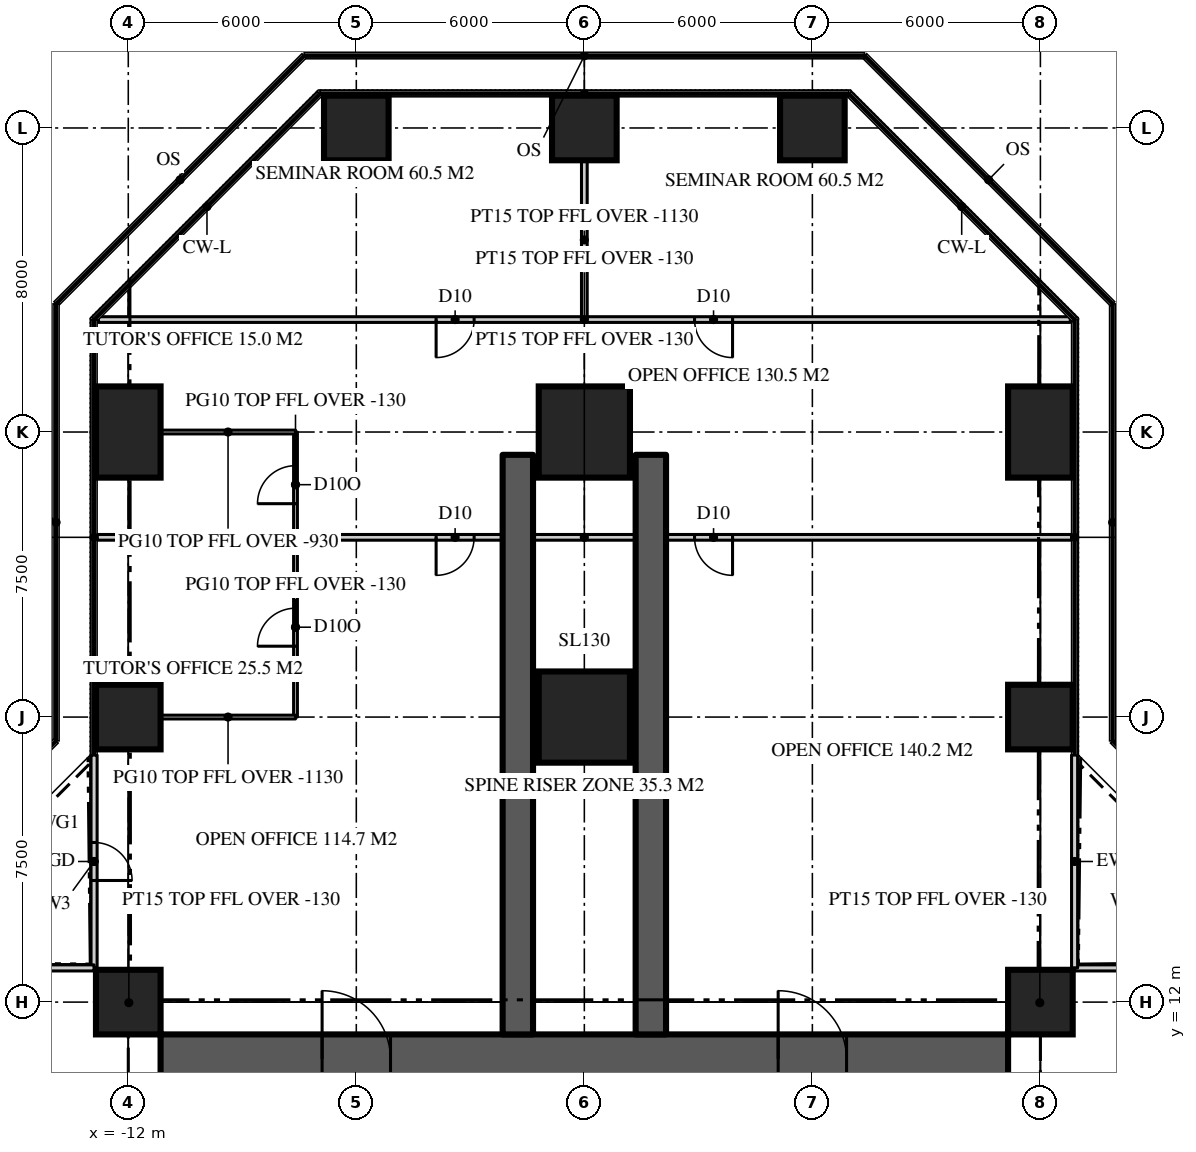
"""IFC4 building model, lengths in metres.
Left out: names, types, materials, properties, quantities, classifications, styles, units other than length and angle.
Written with IfcOpenShell. Run it as: python <this file> out.ifc"""

import sys

from ifc_helpers import new_model, si_unit, direction, frame, frame_2d, origin, origin_2d, place, context, subcontext, project, spatial, rectangle, extrude, element, fill, save


model = new_model("IFC4")
c1 = context("Model", 3, precision=1e-05, world=origin(), true_north=direction((0.0, 1.0)))
c2 = subcontext(c1, "Body", "Model", "MODEL_VIEW")
j1 = project(units=[si_unit("LENGTHUNIT", "METRE"), si_unit("PLANEANGLEUNIT", "RADIAN")], contexts=[c1])
p1 = place(None, origin())
s1 = spatial("IfcSite", under=j1, at=p1, CompositionType="ELEMENT")
p2 = place(p1, origin())
s2 = spatial("IfcBuilding", under=s1, at=p2, CompositionType="ELEMENT")
p3 = place(p2, frame((0.0, 0.0, 109.8)))
s3 = spatial("IfcBuildingStorey", under=s2, at=p3, CompositionType="ELEMENT", Elevation=109.8)
p4 = place(p3, frame((-11.15, 10.5, 0.0), z_axis=(0.0, 0.0, 1.0), x_axis=(1.0, 0.0, 0.0)))
e1 = element("IfcWall", 1, at=p4, inside=s3, PredefinedType="SHEAR", context=c2, shape_type="SweptSolid", body=[
    extrude(rectangle(XDim=22.3, YDim=1.3, at=frame_2d((11.15, 0.0))), origin(), (0.0, 0.0, 1.0), 3.9),
])
p5 = place(p4, frame((4.25, 0.0, 0.0)))
e2 = element("IfcOpeningElement", 2, at=p5, cuts=e1, PredefinedType="OPENING", context=c2, shape_type="SweptSolid", body=[
    extrude(rectangle(XDim=1.8, YDim=2.2, at=frame_2d((0.9, 1.1))), frame((0.0, 0.66, 0.0), z_axis=(0.0, -1.0, 0.0), x_axis=(1.0, 0.0, 0.0)), (0.0, 0.0, 1.0), 1.32),
])
p6 = place(p4, frame((16.25, 0.0, 0.0)))
e3 = element("IfcOpeningElement", 3, at=p6, cuts=e1, PredefinedType="OPENING", context=c2, shape_type="SweptSolid", body=[
    extrude(rectangle(XDim=1.8, YDim=2.2, at=frame_2d((0.9, 1.1))), frame((0.0, 0.66, 0.0), z_axis=(0.0, -1.0, 0.0), x_axis=(1.0, 0.0, 0.0)), (0.0, 0.0, 1.0), 1.32),
])
for number, where, z_axis, x_axis in (
    (4, (1.75, 11.15, 0.0), (0.0, 0.0, 1.0), (0.0, 1.0, 0.0)),
    (5, (-1.75, 11.15, 0.0), (0.0, 0.0, 1.0), (0.0, 1.0, 0.0)),
):
    element("IfcWall", number, at=place(p3, frame(where, z_axis=z_axis, x_axis=x_axis)), inside=s3, PredefinedType="SHEAR", context=c2, shape_type="SweptSolid", body=[
        extrude(rectangle(XDim=15.25, YDim=0.8, at=frame_2d((7.625, 0.0))), origin(), (0.0, 0.0, 1.0), 3.9),
    ])
for number, where, z_axis, x_axis in (
    (6, (-12.0, 12.0, 0.0), (0.0, 0.0, 1.0), (1.0, 0.0, 0.0)),
    (7, (12.0, 12.0, 0.0), (0.0, 0.0, 1.0), (1.0, 0.0, 0.0)),
    (8, (-12.0, 19.5, 0.0), (0.0, 0.0, 1.0), (1.0, 0.0, 0.0)),
):
    element("IfcColumn", number, at=place(p3, frame(where, z_axis=z_axis, x_axis=x_axis)), inside=s3, PredefinedType="COLUMN", context=c2, shape_type="SweptSolid", body=[
        extrude(rectangle(XDim=1.7, YDim=1.7, at=origin_2d()), origin(), (0.0, 0.0, 1.0), 3.9),
    ])
p7 = place(p3, frame((0.0, 19.5, 0.0), z_axis=(0.0, 0.0, 1.0), x_axis=(1.0, 0.0, 0.0)))
e9 = element("IfcColumn", 9, at=p7, inside=s3, PredefinedType="COLUMN", context=c2, shape_type="SweptSolid", body=[
    extrude(rectangle(XDim=2.4, YDim=2.4, at=origin_2d()), origin(), (0.0, 0.0, 1.0), 3.9),
])
p8 = place(p3, frame((12.0, 19.5, 0.0), z_axis=(0.0, 0.0, 1.0), x_axis=(1.0, 0.0, 0.0)))
e10 = element("IfcColumn", 10, at=p8, inside=s3, PredefinedType="COLUMN", context=c2, shape_type="SweptSolid", body=[
    extrude(rectangle(XDim=1.7, YDim=1.7, at=origin_2d()), origin(), (0.0, 0.0, 1.0), 3.9),
])
p9 = place(p3, frame((-12.0, 27.0, 0.0), z_axis=(0.0, 0.0, 1.0), x_axis=(1.0, 0.0, 0.0)))
e11 = element("IfcColumn", 11, at=p9, inside=s3, PredefinedType="COLUMN", context=c2, shape_type="SweptSolid", body=[
    extrude(rectangle(XDim=1.7, YDim=2.4, at=origin_2d()), origin(), (0.0, 0.0, 1.0), 3.9),
])
p10 = place(p3, frame((0.0, 27.0, 0.0), z_axis=(0.0, 0.0, 1.0), x_axis=(1.0, 0.0, 0.0)))
e12 = element("IfcColumn", 12, at=p10, inside=s3, PredefinedType="COLUMN", context=c2, shape_type="SweptSolid", body=[
    extrude(rectangle(XDim=2.4, YDim=2.4, at=origin_2d()), origin(), (0.0, 0.0, 1.0), 3.9),
])
p11 = place(p3, frame((12.0, 27.0, 0.0), z_axis=(0.0, 0.0, 1.0), x_axis=(1.0, 0.0, 0.0)))
e13 = element("IfcColumn", 13, at=p11, inside=s3, PredefinedType="COLUMN", context=c2, shape_type="SweptSolid", body=[
    extrude(rectangle(XDim=1.7, YDim=2.4, at=origin_2d()), origin(), (0.0, 0.0, 1.0), 3.9),
])
for number, where, z_axis, x_axis in (
    (14, (-6.0, 35.0, 0.0), (0.0, 0.0, 1.0), (1.0, 0.0, 0.0)),
    (15, (0.0, 35.0, 0.0), (0.0, 0.0, 1.0), (1.0, 0.0, 0.0)),
    (16, (6.0, 35.0, 0.0), (0.0, 0.0, 1.0), (1.0, 0.0, 0.0)),
):
    element("IfcColumn", number, at=place(p3, frame(where, z_axis=z_axis, x_axis=x_axis)), inside=s3, PredefinedType="COLUMN", context=c2, shape_type="SweptSolid", body=[
        extrude(rectangle(XDim=1.7, YDim=1.7, at=origin_2d()), origin(), (0.0, 0.0, 1.0), 3.9),
    ])
p12 = place(p3, frame((18.5, 12.9, 0.0), z_axis=(0.0, 0.0, 1.0), x_axis=(-1.0, 0.0, 0.0)))
e17 = element("IfcWall", 17, at=p12, inside=s3, PredefinedType="SOLIDWALL", context=c2, shape_type="SweptSolid", body=[
    extrude(rectangle(XDim=5.6, YDim=0.16, at=frame_2d((2.8, 0.0))), origin(), (0.0, 0.0, 1.0), 3.77),
])
p13 = place(p12, frame((2.3, 0.0, 0.0)))
e18 = element("IfcOpeningElement", 18, at=p13, cuts=e17, PredefinedType="OPENING", context=c2, shape_type="SweptSolid", body=[
    extrude(rectangle(XDim=1.0, YDim=2.2, at=frame_2d((0.5, 1.1))), frame((0.0, 0.09, 0.0), z_axis=(0.0, -1.0, 0.0), x_axis=(1.0, 0.0, 0.0)), (0.0, 0.0, 1.0), 0.18),
])
p14 = place(p3, frame((12.9, 12.9, 0.0), z_axis=(0.0, 0.0, 1.0), x_axis=(0.0, 1.0, 0.0)))
e19 = element("IfcWall", 19, at=p14, inside=s3, PredefinedType="SOLIDWALL", context=c2, shape_type="SweptSolid", body=[
    extrude(rectangle(XDim=5.6, YDim=0.16, at=frame_2d((2.8, 0.0))), origin(), (0.0, 0.0, 1.0), 3.77),
])
p15 = place(p3, frame((-12.9, 18.5, 0.0), z_axis=(0.0, 0.0, 1.0), x_axis=(0.0, -1.0, 0.0)))
e20 = element("IfcWall", 20, at=p15, inside=s3, PredefinedType="SOLIDWALL", context=c2, shape_type="SweptSolid", body=[
    extrude(rectangle(XDim=5.6, YDim=0.16, at=frame_2d((2.8, 0.0))), origin(), (0.0, 0.0, 1.0), 3.77),
])
p16 = place(p15, frame((2.3, 0.0, 0.0)))
e21 = element("IfcOpeningElement", 21, at=p16, cuts=e20, PredefinedType="OPENING", context=c2, shape_type="SweptSolid", body=[
    extrude(rectangle(XDim=1.0, YDim=2.2, at=frame_2d((0.5, 1.1))), frame((0.0, 0.09, 0.0), z_axis=(0.0, -1.0, 0.0), x_axis=(1.0, 0.0, 0.0)), (0.0, 0.0, 1.0), 0.18),
])
p17 = place(p3, frame((-12.9, 12.9, 0.0), z_axis=(0.0, 0.0, 1.0), x_axis=(-1.0, 0.0, 0.0)))
e22 = element("IfcWall", 22, at=p17, inside=s3, PredefinedType="SOLIDWALL", context=c2, shape_type="SweptSolid", body=[
    extrude(rectangle(XDim=5.6, YDim=0.16, at=frame_2d((2.8, 0.0))), origin(), (0.0, 0.0, 1.0), 3.77),
])
p18 = place(p3, frame((12.82, 24.229, 0.0), z_axis=(0.0, 0.0, 1.0), x_axis=(-1.0, 0.0, 0.0)))
e23 = element("IfcWall", 23, at=p18, inside=s3, PredefinedType="PARTITIONING", context=c2, shape_type="SweptSolid", body=[
    extrude(rectangle(XDim=25.64, YDim=0.15, at=frame_2d((12.82, 0.0))), origin(), (0.0, 0.0, 1.0), 3.77),
])
p19 = place(p18, frame((15.72, 0.0, 0.0)))
e24 = element("IfcOpeningElement", 24, at=p19, cuts=e23, PredefinedType="OPENING", context=c2, shape_type="SweptSolid", body=[
    extrude(rectangle(XDim=1.0, YDim=2.2, at=frame_2d((0.5, 1.1))), frame((0.0, 0.085, 0.0), z_axis=(0.0, -1.0, 0.0), x_axis=(1.0, 0.0, 0.0)), (0.0, 0.0, 1.0), 0.17),
])
p20 = place(p18, frame((8.92, 0.0, 0.0)))
e25 = element("IfcOpeningElement", 25, at=p20, cuts=e23, PredefinedType="OPENING", context=c2, shape_type="SweptSolid", body=[
    extrude(rectangle(XDim=1.0, YDim=2.2, at=frame_2d((0.5, 1.1))), frame((0.0, 0.085, 0.0), z_axis=(0.0, -1.0, 0.0), x_axis=(1.0, 0.0, 0.0)), (0.0, 0.0, 1.0), 0.17),
])
p21 = place(p3, frame((12.786, 29.959, 0.0), z_axis=(0.0, 0.0, 1.0), x_axis=(-1.0, 0.0, 0.0)))
e26 = element("IfcWall", 26, at=p21, inside=s3, PredefinedType="PARTITIONING", context=c2, shape_type="SweptSolid", body=[
    extrude(rectangle(XDim=25.573, YDim=0.15, at=frame_2d((12.786, 0.0))), origin(), (0.0, 0.0, 1.0), 3.77),
])
p22 = place(p21, frame((15.687, 0.0, 0.0)))
e27 = element("IfcOpeningElement", 27, at=p22, cuts=e26, PredefinedType="OPENING", context=c2, shape_type="SweptSolid", body=[
    extrude(rectangle(XDim=1.0, YDim=2.2, at=frame_2d((0.5, 1.1))), frame((0.0, 0.085, 0.0), z_axis=(0.0, -1.0, 0.0), x_axis=(1.0, 0.0, 0.0)), (0.0, 0.0, 1.0), 0.17),
])
p23 = place(p21, frame((8.886, 0.0, 0.0)))
e28 = element("IfcOpeningElement", 28, at=p23, cuts=e26, PredefinedType="OPENING", context=c2, shape_type="SweptSolid", body=[
    extrude(rectangle(XDim=1.0, YDim=2.2, at=frame_2d((0.5, 1.1))), frame((0.0, 0.085, 0.0), z_axis=(0.0, -1.0, 0.0), x_axis=(1.0, 0.0, 0.0)), (0.0, 0.0, 1.0), 0.17),
])
p24 = place(p3, frame((0.0, 29.959, 0.0), z_axis=(0.0, 0.0, 1.0), x_axis=(0.0, 1.0, 0.0)))
e29 = element("IfcWall", 29, at=p24, inside=s3, PredefinedType="PARTITIONING", context=c2, shape_type="SweptSolid", body=[
    extrude(rectangle(XDim=4.191, YDim=0.15, at=frame_2d((2.095, 0.0))), origin(), (0.0, 0.0, 1.0), 2.77),
])
p25 = place(p3, frame((-7.6, 19.5, 0.0), z_axis=(0.0, 0.0, 1.0), x_axis=(0.0, 1.0, 0.0)))
e30 = element("IfcWall", 30, at=p25, inside=s3, PredefinedType="PARTITIONING", context=c2, shape_type="SweptSolid", body=[
    extrude(rectangle(XDim=4.729, YDim=0.1, at=frame_2d((2.365, 0.0))), origin(), (0.0, 0.0, 1.0), 3.77),
])
p26 = place(p25, frame((1.865, 0.0, 0.0)))
e31 = element("IfcOpeningElement", 31, at=p26, cuts=e30, PredefinedType="OPENING", context=c2, shape_type="SweptSolid", body=[
    extrude(rectangle(XDim=1.0, YDim=2.2, at=frame_2d((0.5, 1.1))), frame((0.0, 0.06, 0.0), z_axis=(0.0, -1.0, 0.0), x_axis=(1.0, 0.0, 0.0)), (0.0, 0.0, 1.0), 0.12),
])
p27 = place(p3, frame((-7.6, 24.229, 0.0), z_axis=(0.0, 0.0, 1.0), x_axis=(0.0, 1.0, 0.0)))
e32 = element("IfcWall", 32, at=p27, inside=s3, PredefinedType="PARTITIONING", context=c2, shape_type="SweptSolid", body=[
    extrude(rectangle(XDim=2.771, YDim=0.1, at=frame_2d((1.385, 0.0))), origin(), (0.0, 0.0, 1.0), 3.77),
])
p28 = place(p27, frame((0.885, 0.0, 0.0)))
e33 = element("IfcOpeningElement", 33, at=p28, cuts=e32, PredefinedType="OPENING", context=c2, shape_type="SweptSolid", body=[
    extrude(rectangle(XDim=1.0, YDim=2.2, at=frame_2d((0.5, 1.1))), frame((0.0, 0.06, 0.0), z_axis=(0.0, -1.0, 0.0), x_axis=(1.0, 0.0, 0.0)), (0.0, 0.0, 1.0), 0.12),
])
p29 = place(p3, frame((-7.6, 19.5, 0.0), z_axis=(0.0, 0.0, 1.0), x_axis=(-1.0, 0.0, 0.0)))
e34 = element("IfcWall", 34, at=p29, inside=s3, PredefinedType="PARTITIONING", context=c2, shape_type="SweptSolid", body=[
    extrude(rectangle(XDim=3.55, YDim=0.1, at=frame_2d((1.775, 0.0))), origin(), (0.0, 0.0, 1.0), 2.77),
])
p30 = place(p3, frame((-7.6, 27.0, 0.0), z_axis=(0.0, 0.0, 1.0), x_axis=(-1.0, 0.0, 0.0)))
e35 = element("IfcWall", 35, at=p30, inside=s3, PredefinedType="PARTITIONING", context=c2, shape_type="SweptSolid", body=[
    extrude(rectangle(XDim=3.55, YDim=0.1, at=frame_2d((1.775, 0.0))), origin(), (0.0, 0.0, 1.0), 2.97),
])
for number, where, z_axis, x_axis in (
    (36, (11.15, 11.15, 0.0), (0.0, 0.0, 1.0), (0.707, 0.707, 0.0)),
    (37, (-11.15, 11.15, 0.0), (0.0, 0.0, 1.0), (-0.707, 0.707, 0.0)),
):
    element("IfcWall", number, at=place(p3, frame(where, z_axis=z_axis, x_axis=x_axis)), inside=s3, PredefinedType="PARTITIONING", context=c2, shape_type="SweptSolid", body=[
        extrude(rectangle(XDim=2.362, YDim=0.15, at=frame_2d((1.181, 0.0))), origin(), (0.0, 0.0, 1.0), 3.77),
    ])
p31 = place(p16, origin())
e38 = element("IfcDoor", 38, at=p31, inside=s3, OperationType="SINGLE_SWING_RIGHT", PredefinedType="DOOR", context=c2, shape_type="SweptSolid", body=[
    extrude(rectangle(XDim=1.0, YDim=2.2, at=frame_2d((0.5, 1.1))), frame((0.0, 0.025, 0.0), z_axis=(0.0, -1.0, 0.0), x_axis=(1.0, 0.0, 0.0)), (0.0, 0.0, 1.0), 0.05),
])
fill(e21, e38)
p32 = place(p5, origin())
e39 = element("IfcDoor", 39, at=p32, inside=s3, OperationType="DOUBLE_DOOR_DOUBLE_SWING", PredefinedType="DOOR", context=c2, shape_type="SweptSolid", body=[
    extrude(rectangle(XDim=1.8, YDim=2.2, at=frame_2d((0.9, 1.1))), frame((0.0, 0.025, 0.0), z_axis=(0.0, -1.0, 0.0), x_axis=(1.0, 0.0, 0.0)), (0.0, 0.0, 1.0), 0.05),
])
fill(e2, e39)
p33 = place(p6, origin())
e40 = element("IfcDoor", 40, at=p33, inside=s3, OperationType="DOUBLE_DOOR_DOUBLE_SWING", PredefinedType="DOOR", context=c2, shape_type="SweptSolid", body=[
    extrude(rectangle(XDim=1.8, YDim=2.2, at=frame_2d((0.9, 1.1))), frame((0.0, 0.025, 0.0), z_axis=(0.0, -1.0, 0.0), x_axis=(1.0, 0.0, 0.0)), (0.0, 0.0, 1.0), 0.05),
])
fill(e3, e40)
p34 = place(p19, origin())
e41 = element("IfcDoor", 41, at=p34, inside=s3, OperationType="SINGLE_SWING_RIGHT", PredefinedType="DOOR", context=c2, shape_type="SweptSolid", body=[
    extrude(rectangle(XDim=1.0, YDim=2.2, at=frame_2d((0.5, 1.1))), frame((0.0, 0.025, 0.0), z_axis=(0.0, -1.0, 0.0), x_axis=(1.0, 0.0, 0.0)), (0.0, 0.0, 1.0), 0.05),
])
fill(e24, e41)
p35 = place(p20, origin())
e42 = element("IfcDoor", 42, at=p35, inside=s3, OperationType="SINGLE_SWING_LEFT", PredefinedType="DOOR", context=c2, shape_type="SweptSolid", body=[
    extrude(rectangle(XDim=1.0, YDim=2.2, at=frame_2d((0.5, 1.1))), frame((0.0, 0.025, 0.0), z_axis=(0.0, -1.0, 0.0), x_axis=(1.0, 0.0, 0.0)), (0.0, 0.0, 1.0), 0.05),
])
fill(e25, e42)
p36 = place(p22, origin())
e43 = element("IfcDoor", 43, at=p36, inside=s3, OperationType="SINGLE_SWING_RIGHT", PredefinedType="DOOR", context=c2, shape_type="SweptSolid", body=[
    extrude(rectangle(XDim=1.0, YDim=2.2, at=frame_2d((0.5, 1.1))), frame((0.0, 0.025, 0.0), z_axis=(0.0, -1.0, 0.0), x_axis=(1.0, 0.0, 0.0)), (0.0, 0.0, 1.0), 0.05),
])
fill(e27, e43)
p37 = place(p23, origin())
e44 = element("IfcDoor", 44, at=p37, inside=s3, OperationType="SINGLE_SWING_LEFT", PredefinedType="DOOR", context=c2, shape_type="SweptSolid", body=[
    extrude(rectangle(XDim=1.0, YDim=2.2, at=frame_2d((0.5, 1.1))), frame((0.0, 0.025, 0.0), z_axis=(0.0, -1.0, 0.0), x_axis=(1.0, 0.0, 0.0)), (0.0, 0.0, 1.0), 0.05),
])
fill(e28, e44)
p38 = place(p26, origin())
e45 = element("IfcDoor", 45, at=p38, inside=s3, OperationType="SINGLE_SWING_LEFT", PredefinedType="DOOR", context=c2, shape_type="SweptSolid", body=[
    extrude(rectangle(XDim=1.0, YDim=2.2, at=frame_2d((0.5, 1.1))), frame((0.0, 0.025, 0.0), z_axis=(0.0, -1.0, 0.0), x_axis=(1.0, 0.0, 0.0)), (0.0, 0.0, 1.0), 0.05),
])
fill(e31, e45)
p39 = place(p28, origin())
e46 = element("IfcDoor", 46, at=p39, inside=s3, OperationType="SINGLE_SWING_LEFT", PredefinedType="DOOR", context=c2, shape_type="SweptSolid", body=[
    extrude(rectangle(XDim=1.0, YDim=2.2, at=frame_2d((0.5, 1.1))), frame((0.0, 0.025, 0.0), z_axis=(0.0, -1.0, 0.0), x_axis=(1.0, 0.0, 0.0)), (0.0, 0.0, 1.0), 0.05),
])
fill(e33, e46)
save(model, sys.argv[1])
